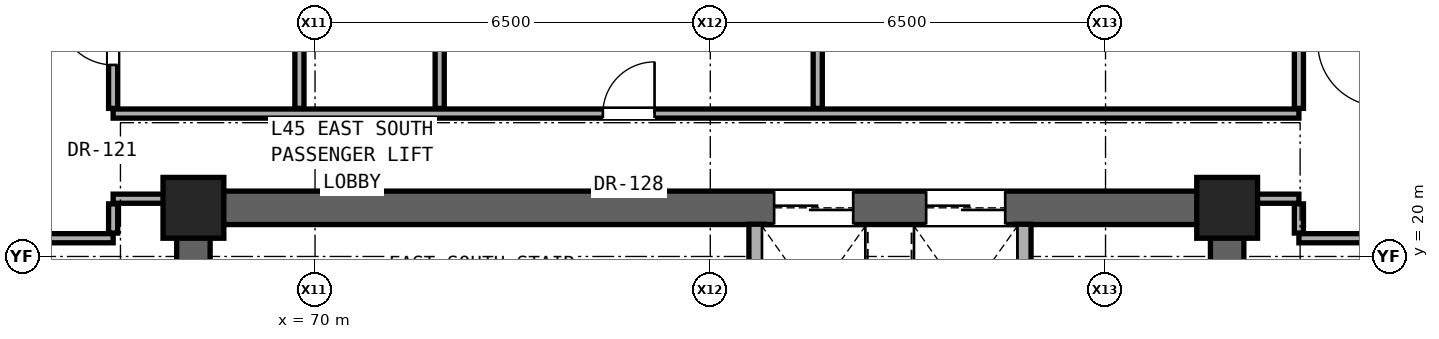
"""IFC4 building model, lengths in metres.
Left out: names, types, materials, properties, quantities, classifications, styles, units other than length and angle.
Written with IfcOpenShell. Run it as: python <this file> out.ifc"""

import sys

from ifc_helpers import new_model, si_unit, direction, frame, frame_2d, origin, origin_2d, place, context, subcontext, project, spatial, rectangle, extrude, element, fill, save


model = new_model("IFC4")
c1 = context("Model", 3, precision=1e-05, world=origin(), true_north=direction((0.0, 1.0)))
c2 = subcontext(c1, "Body", "Model", "MODEL_VIEW")
j1 = project(units=[si_unit("LENGTHUNIT", "METRE"), si_unit("PLANEANGLEUNIT", "RADIAN")], contexts=[c1])
p1 = place(None, origin())
s1 = spatial("IfcSite", under=j1, at=p1, CompositionType="ELEMENT")
p2 = place(p1, origin())
s2 = spatial("IfcBuilding", under=s1, at=p2, CompositionType="ELEMENT")
p3 = place(p2, frame((0.0, 0.0, 160.9)))
s3 = spatial("IfcBuildingStorey", under=s2, at=p3, CompositionType="ELEMENT", Elevation=160.9)
for number, where, z_axis, x_axis in (
    (1, (68.0, 20.8, 0.0), (0.0, 0.0, 1.0), (1.0, 0.0, 0.0)),
    (2, (85.0, 20.8, 0.0), (0.0, 0.0, 1.0), (1.0, 0.0, 0.0)),
):
    element("IfcColumn", number, at=place(p3, frame(where, z_axis=z_axis, x_axis=x_axis)), inside=s3, PredefinedType="COLUMN", context=c2, shape_type="SweptSolid", body=[
        extrude(rectangle(XDim=1.0, YDim=1.0, at=origin_2d()), origin(), (0.0, 0.0, 1.0), 3.25),
    ])
for number, where, z_axis, x_axis in (
    (3, (68.0, 15.2, 0.0), (0.0, 0.0, 1.0), (0.0, 1.0, 0.0)),
    (4, (85.0, 15.2, 0.0), (0.0, 0.0, 1.0), (0.0, 1.0, 0.0)),
):
    element("IfcWall", number, at=place(p3, frame(where, z_axis=z_axis, x_axis=x_axis)), inside=s3, PredefinedType="SHEAR", context=c2, shape_type="SweptSolid", body=[
        extrude(rectangle(XDim=5.6, YDim=0.55, at=frame_2d((2.8, 0.0))), origin(), (0.0, 0.0, 1.0), 3.05),
    ])
p4 = place(p3, frame((68.0, 20.8, 0.0), z_axis=(0.0, 0.0, 1.0), x_axis=(1.0, 0.0, 0.0)))
e5 = element("IfcWall", 5, at=p4, inside=s3, PredefinedType="SHEAR", context=c2, shape_type="SweptSolid", body=[
    extrude(rectangle(XDim=17.0, YDim=0.55, at=frame_2d((8.5, 0.0))), origin(), (0.0, 0.0, 1.0), 3.05),
])
p5 = place(p4, frame((9.55, 0.0, 0.0)))
e6 = element("IfcOpeningElement", 6, at=p5, cuts=e5, PredefinedType="OPENING", context=c2, shape_type="SweptSolid", body=[
    extrude(rectangle(XDim=1.3, YDim=2.3, at=frame_2d((0.65, 1.15))), frame((0.0, 0.285, 0.0), z_axis=(0.0, -1.0, 0.0), x_axis=(1.0, 0.0, 0.0)), (0.0, 0.0, 1.0), 0.57),
])
p6 = place(p4, frame((12.05, 0.0, 0.0)))
e7 = element("IfcOpeningElement", 7, at=p6, cuts=e5, PredefinedType="OPENING", context=c2, shape_type="SweptSolid", body=[
    extrude(rectangle(XDim=1.3, YDim=2.3, at=frame_2d((0.65, 1.15))), frame((0.0, 0.285, 0.0), z_axis=(0.0, -1.0, 0.0), x_axis=(1.0, 0.0, 0.0)), (0.0, 0.0, 1.0), 0.57),
])
p7 = place(p3, frame((65.32, 20.3, 0.0), z_axis=(0.0, 0.0, 1.0), x_axis=(1.0, 0.0, 0.0)))
e8 = element("IfcWall", 8, at=p7, inside=s3, PredefinedType="PARTITIONING", context=c2, shape_type="SweptSolid", body=[
    extrude(rectangle(XDim=1.36, YDim=0.15, at=frame_2d((0.68, 0.0))), origin(), (0.0, 0.0, 1.0), 3.05),
])
p8 = place(p3, frame((86.18, 20.3, 0.0), z_axis=(0.0, 0.0, 1.0), x_axis=(1.0, 0.0, 0.0)))
e9 = element("IfcWall", 9, at=p8, inside=s3, PredefinedType="PARTITIONING", context=c2, shape_type="SweptSolid", body=[
    extrude(rectangle(XDim=1.36, YDim=0.15, at=frame_2d((0.68, 0.0))), origin(), (0.0, 0.0, 1.0), 3.05),
])
p9 = place(p3, frame((66.68, 20.95, 0.0), z_axis=(0.0, 0.0, 1.0), x_axis=(1.0, 0.0, 0.0)))
e10 = element("IfcWall", 10, at=p9, inside=s3, PredefinedType="PARTITIONING", context=c2, shape_type="SweptSolid", body=[
    extrude(rectangle(XDim=1.05, YDim=0.15, at=frame_2d((0.525, 0.0))), origin(), (0.0, 0.0, 1.0), 2.442),
])
p10 = place(p3, frame((85.27, 20.95, 0.0), z_axis=(0.0, 0.0, 1.0), x_axis=(1.0, 0.0, 0.0)))
e11 = element("IfcWall", 11, at=p10, inside=s3, PredefinedType="PARTITIONING", context=c2, shape_type="SweptSolid", body=[
    extrude(rectangle(XDim=0.91, YDim=0.15, at=frame_2d((0.455, 0.0))), origin(), (0.0, 0.0, 1.0), 2.442),
])
p11 = place(p3, frame((66.68, 22.35, 0.0), z_axis=(0.0, 0.0, 1.0), x_axis=(1.0, 0.0, 0.0)))
e12 = element("IfcWall", 12, at=p11, inside=s3, PredefinedType="PARTITIONING", context=c2, shape_type="SweptSolid", body=[
    extrude(rectangle(XDim=19.5, YDim=0.15, at=frame_2d((9.75, 0.0))), origin(), (0.0, 0.0, 1.0), 2.186),
])
p12 = place(p11, frame((8.053, 0.0, 0.0)))
e13 = element("IfcOpeningElement", 13, at=p12, cuts=e12, PredefinedType="OPENING", context=c2, shape_type="SweptSolid", body=[
    extrude(rectangle(XDim=0.85, YDim=2.01, at=frame_2d((0.425, 1.005))), frame((0.0, 0.085, 0.0), z_axis=(0.0, -1.0, 0.0), x_axis=(1.0, 0.0, 0.0)), (0.0, 0.0, 1.0), 0.17),
])
p13 = place(p3, frame((66.68, 20.385, 0.0), z_axis=(0.0, 0.0, 1.0), x_axis=(0.0, 1.0, 0.0)))
e14 = element("IfcWall", 14, at=p13, inside=s3, PredefinedType="PARTITIONING", context=c2, shape_type="SweptSolid", body=[
    extrude(rectangle(XDim=0.48, YDim=0.15, at=frame_2d((0.24, 0.0))), origin(), (0.0, 0.0, 1.0), 2.442),
])
p14 = place(p3, frame((66.68, 22.435, 0.0), z_axis=(0.0, 0.0, 1.0), x_axis=(0.0, 1.0, 0.0)))
e15 = element("IfcWall", 15, at=p14, inside=s3, PredefinedType="PARTITIONING", context=c2, shape_type="SweptSolid", body=[
    extrude(rectangle(XDim=2.33, YDim=0.15, at=frame_2d((1.165, 0.0))), origin(), (0.0, 0.0, 1.0), 3.05),
])
p15 = place(p14, frame((0.715, 0.0, 0.0)))
e16 = element("IfcOpeningElement", 16, at=p15, cuts=e15, PredefinedType="OPENING", context=c2, shape_type="SweptSolid", body=[
    extrude(rectangle(XDim=0.9, YDim=2.1, at=frame_2d((0.45, 1.05))), frame((0.0, 0.085, 0.0), z_axis=(0.0, -1.0, 0.0), x_axis=(1.0, 0.0, 0.0)), (0.0, 0.0, 1.0), 0.17),
])
p16 = place(p3, frame((69.743, 22.435, 0.0), z_axis=(0.0, 0.0, 1.0), x_axis=(0.0, 1.0, 0.0)))
e17 = element("IfcWall", 17, at=p16, inside=s3, PredefinedType="PARTITIONING", context=c2, shape_type="SweptSolid", body=[
    extrude(rectangle(XDim=2.33, YDim=0.15, at=frame_2d((1.165, 0.0))), origin(), (0.0, 0.0, 1.0), 3.05),
])
p17 = place(p3, frame((72.05, 22.435, 0.0), z_axis=(0.0, 0.0, 1.0), x_axis=(0.0, 1.0, 0.0)))
e18 = element("IfcWall", 18, at=p17, inside=s3, PredefinedType="PARTITIONING", context=c2, shape_type="SweptSolid", body=[
    extrude(rectangle(XDim=8.13, YDim=0.15, at=frame_2d((4.065, 0.0))), origin(), (0.0, 0.0, 1.0), 2.186),
])
p18 = place(p3, frame((77.26, 18.735, 0.0), z_axis=(0.0, 0.0, 1.0), x_axis=(0.0, 1.0, 0.0)))
e19 = element("IfcWall", 19, at=p18, inside=s3, PredefinedType="SOLIDWALL", context=c2, shape_type="SweptSolid", body=[
    extrude(rectangle(XDim=1.795, YDim=0.25, at=frame_2d((0.897, 0.0))), origin(), (0.0, 0.0, 1.0), 3.05),
])
p19 = place(p3, frame((78.267, 22.435, 0.0), z_axis=(0.0, 0.0, 1.0), x_axis=(0.0, 1.0, 0.0)))
e20 = element("IfcWall", 20, at=p19, inside=s3, PredefinedType="PARTITIONING", context=c2, shape_type="SweptSolid", body=[
    extrude(rectangle(XDim=8.13, YDim=0.15, at=frame_2d((4.065, 0.0))), origin(), (0.0, 0.0, 1.0), 2.186),
])
p20 = place(p3, frame((81.65, 18.185, 0.0), z_axis=(0.0, 0.0, 1.0), x_axis=(0.0, 1.0, 0.0)))
e21 = element("IfcWall", 21, at=p20, inside=s3, PredefinedType="SOLIDWALL", context=c2, shape_type="SweptSolid", body=[
    extrude(rectangle(XDim=2.345, YDim=0.25, at=frame_2d((1.172, 0.0))), origin(), (0.0, 0.0, 1.0), 3.05),
])
p21 = place(p3, frame((86.18, 20.385, 0.0), z_axis=(0.0, 0.0, 1.0), x_axis=(0.0, 1.0, 0.0)))
e22 = element("IfcWall", 22, at=p21, inside=s3, PredefinedType="PARTITIONING", context=c2, shape_type="SweptSolid", body=[
    extrude(rectangle(XDim=0.48, YDim=0.15, at=frame_2d((0.24, 0.0))), origin(), (0.0, 0.0, 1.0), 2.442),
])
p22 = place(p3, frame((86.18, 22.435, 0.0), z_axis=(0.0, 0.0, 1.0), x_axis=(0.0, 1.0, 0.0)))
e23 = element("IfcWall", 23, at=p22, inside=s3, PredefinedType="PARTITIONING", context=c2, shape_type="SweptSolid", body=[
    extrude(rectangle(XDim=8.13, YDim=0.15, at=frame_2d((4.065, 0.0))), origin(), (0.0, 0.0, 1.0), 2.346),
])
p23 = place(p15, origin())
e24 = element("IfcDoor", 24, at=p23, inside=s3, OperationType="SINGLE_SWING_RIGHT", PredefinedType="DOOR", context=c2, shape_type="SweptSolid", body=[
    extrude(rectangle(XDim=0.9, YDim=2.1, at=frame_2d((0.45, 1.05))), frame((0.0, 0.025, 0.0), z_axis=(0.0, -1.0, 0.0), x_axis=(1.0, 0.0, 0.0)), (0.0, 0.0, 1.0), 0.05),
])
fill(e16, e24)
p24 = place(p12, origin())
e25 = element("IfcDoor", 25, at=p24, inside=s3, OperationType="SINGLE_SWING_RIGHT", PredefinedType="DOOR", context=c2, shape_type="SweptSolid", body=[
    extrude(rectangle(XDim=0.85, YDim=2.01, at=frame_2d((0.425, 1.005))), frame((0.0, 0.025, 0.0), z_axis=(0.0, -1.0, 0.0), x_axis=(1.0, 0.0, 0.0)), (0.0, 0.0, 1.0), 0.05),
])
fill(e13, e25)
p25 = place(p5, origin())
e26 = element("IfcDoor", 26, at=p25, inside=s3, OperationType="DOUBLE_DOOR_SLIDING", PredefinedType="DOOR", context=c2, shape_type="SweptSolid", body=[
    extrude(rectangle(XDim=1.3, YDim=2.3, at=frame_2d((0.65, 1.15))), frame((0.0, 0.025, 0.0), z_axis=(0.0, -1.0, 0.0), x_axis=(1.0, 0.0, 0.0)), (0.0, 0.0, 1.0), 0.05),
])
fill(e6, e26)
p26 = place(p6, origin())
e27 = element("IfcDoor", 27, at=p26, inside=s3, OperationType="DOUBLE_DOOR_SLIDING", PredefinedType="DOOR", context=c2, shape_type="SweptSolid", body=[
    extrude(rectangle(XDim=1.3, YDim=2.3, at=frame_2d((0.65, 1.15))), frame((0.0, 0.025, 0.0), z_axis=(0.0, -1.0, 0.0), x_axis=(1.0, 0.0, 0.0)), (0.0, 0.0, 1.0), 0.05),
])
fill(e7, e27)
save(model, sys.argv[1])
